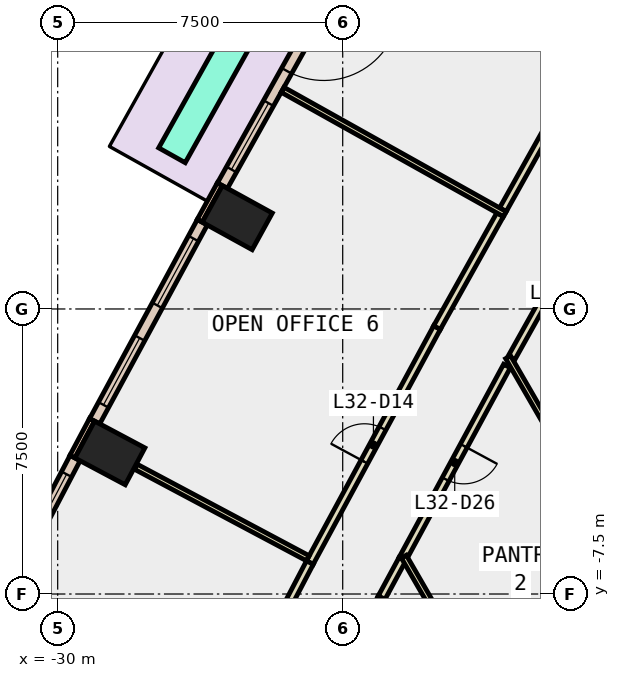
"""IFC4 building model, lengths in metres.
Left out: names, types, materials, properties, quantities, classifications, styles, units other than length and angle.
Written with IfcOpenShell. Run it as: python <this file> out.ifc"""

import sys

from ifc_helpers import new_model, si_unit, direction, frame, frame_2d, origin, origin_2d, place, context, subcontext, project, spatial, rectangle, extrude, element, fill, save


model = new_model("IFC4")
c1 = context("Model", 3, precision=1e-05, world=origin(), true_north=direction((0.0, 1.0)))
c2 = subcontext(c1, "Body", "Model", "MODEL_VIEW")
j1 = project(units=[si_unit("LENGTHUNIT", "METRE"), si_unit("PLANEANGLEUNIT", "RADIAN")], contexts=[c1])
p1 = place(None, origin())
s1 = spatial("IfcSite", under=j1, at=p1, CompositionType="ELEMENT")
p2 = place(p1, origin())
s2 = spatial("IfcBuilding", under=s1, at=p2, CompositionType="ELEMENT")
p3 = place(p2, frame((0.0, 0.0, 146.6)))
s3 = spatial("IfcBuildingStorey", under=s2, at=p3, CompositionType="ELEMENT", Elevation=146.6)
for number, where, z_axis, x_axis in (
    (1, (-25.275, 2.403, -0.4), (0.0, 0.0, 1.0), (0.482, 0.876, 0.0)),
    (2, (-28.626, -3.788, -0.4), (0.0, 0.0, 1.0), (0.47, 0.883, 0.0)),
):
    element("IfcColumn", number, at=place(p3, frame(where, z_axis=z_axis, x_axis=x_axis)), inside=s3, PredefinedType="COLUMN", context=c2, shape_type="SweptSolid", body=[
        extrude(rectangle(XDim=1.1, YDim=1.5, at=origin_2d()), origin(), (0.0, 0.0, 1.0), 4.2),
    ])
for number, where, z_axis, x_axis in (
    (3, (-25.733, 3.283, 0.0), (0.0, 0.0, 1.0), (-0.482, -0.876, 0.0)),
    (4, (-29.095, -2.915, 0.0), (0.0, 0.0, 1.0), (-0.47, -0.883, 0.0)),
):
    element("IfcWall", number, at=place(p3, frame(where, z_axis=z_axis, x_axis=x_axis)), inside=s3, PredefinedType="STANDARD", context=c2, shape_type="SweptSolid", body=[
        extrude(rectangle(XDim=1.1, YDim=0.15, at=frame_2d((0.55, 0.0))), origin(), (0.0, 0.0, 1.0), 3.8),
    ])
p4 = place(p3, frame((-22.761, 8.438, 0.0), z_axis=(0.0, 0.0, 1.0), x_axis=(-0.488009846284, -0.872838123555, 0.0)))
e5 = element("IfcWall", 5, at=p4, inside=s3, PredefinedType="STANDARD", context=c2, shape_type="SweptSolid", body=[
    extrude(rectangle(XDim=5.951, YDim=0.3, at=frame_2d((2.976, 0.0))), origin(), (0.0, 0.0, 1.0), 3.8),
])
p5 = place(p4, frame((0.488, 0.0, 0.0)))
e6 = element("IfcOpeningElement", 6, at=p5, cuts=e5, PredefinedType="OPENING", context=c2, shape_type="SweptSolid", body=[
    extrude(rectangle(XDim=2.0, YDim=2.4, at=frame_2d((1.0, 1.2))), frame((0.0, 0.16, 0.0), z_axis=(0.0, -1.0, 0.0), x_axis=(1.0, 0.0, 0.0)), (0.0, 0.0, 1.0), 0.32),
])
p6 = place(p4, frame((3.463, 0.0, 0.9)))
e7 = element("IfcOpeningElement", 7, at=p6, cuts=e5, PredefinedType="OPENING", context=c2, shape_type="SweptSolid", body=[
    extrude(rectangle(XDim=2.0, YDim=2.6, at=frame_2d((1.0, 1.3))), frame((0.0, 0.16, 0.0), z_axis=(0.0, -1.0, 0.0), x_axis=(1.0, 0.0, 0.0)), (0.0, 0.0, 1.0), 0.32),
])
p7 = place(p3, frame((-26.194, 2.282, 0.0), z_axis=(0.0, 0.0, 1.0), x_axis=(-0.475794135288, -0.87955667289, 0.0)))
e8 = element("IfcWall", 8, at=p7, inside=s3, PredefinedType="STANDARD", context=c2, shape_type="SweptSolid", body=[
    extrude(rectangle(XDim=5.952, YDim=0.3, at=frame_2d((2.976, 0.0))), origin(), (0.0, 0.0, 1.0), 3.8),
])
p8 = place(p7, frame((0.488, 0.0, 0.9)))
e9 = element("IfcOpeningElement", 9, at=p8, cuts=e8, PredefinedType="OPENING", context=c2, shape_type="SweptSolid", body=[
    extrude(rectangle(XDim=2.0, YDim=2.6, at=frame_2d((1.0, 1.3))), frame((0.0, 0.16, 0.0), z_axis=(0.0, -1.0, 0.0), x_axis=(1.0, 0.0, 0.0)), (0.0, 0.0, 1.0), 0.32),
])
p9 = place(p7, frame((3.464, 0.0, 0.9)))
e10 = element("IfcOpeningElement", 10, at=p9, cuts=e8, PredefinedType="OPENING", context=c2, shape_type="SweptSolid", body=[
    extrude(rectangle(XDim=2.0, YDim=2.6, at=frame_2d((1.0, 1.3))), frame((0.0, 0.16, 0.0), z_axis=(0.0, -1.0, 0.0), x_axis=(1.0, 0.0, 0.0)), (0.0, 0.0, 1.0), 0.32),
])
p10 = place(p3, frame((-29.542, -3.922, 0.0), z_axis=(0.0, 0.0, 1.0), x_axis=(-0.463809970306, -0.885934710599, 0.0)))
e11 = element("IfcWall", 11, at=p10, inside=s3, PredefinedType="STANDARD", context=c2, shape_type="SweptSolid", body=[
    extrude(rectangle(XDim=5.927, YDim=0.3, at=frame_2d((2.963, 0.0))), origin(), (0.0, 0.0, 1.0), 3.8),
])
p11 = place(p10, frame((0.482, 0.0, 0.9)))
e12 = element("IfcOpeningElement", 12, at=p11, cuts=e11, PredefinedType="OPENING", context=c2, shape_type="SweptSolid", body=[
    extrude(rectangle(XDim=2.0, YDim=2.6, at=frame_2d((1.0, 1.3))), frame((0.0, 0.16, 0.0), z_axis=(0.0, -1.0, 0.0), x_axis=(1.0, 0.0, 0.0)), (0.0, 0.0, 1.0), 0.32),
])
p12 = place(p10, frame((3.445, 0.0, 0.9)))
e13 = element("IfcOpeningElement", 13, at=p12, cuts=e11, PredefinedType="OPENING", context=c2, shape_type="SweptSolid", body=[
    extrude(rectangle(XDim=2.0, YDim=2.6, at=frame_2d((1.0, 1.3))), frame((0.0, 0.16, 0.0), z_axis=(0.0, -1.0, 0.0), x_axis=(1.0, 0.0, 0.0)), (0.0, 0.0, 1.0), 0.32),
])
p13 = place(p3, frame((-24.138, 9.151, 0.0), z_axis=(0.0, 0.0, 1.0), x_axis=(-0.487965376719, -0.87286298531, 0.0)))
e14 = element("IfcWall", 14, at=p13, inside=s3, PredefinedType="STANDARD", context=c2, shape_type="SweptSolid", body=[
    extrude(rectangle(XDim=5.851, YDim=0.8, at=frame_2d((2.925, 0.0))), origin(), (0.0, 0.0, 1.0), 0.8),
])
p14 = place(p3, frame((-14.955, 4.264, 0.0), z_axis=(0.0, 0.0, 1.0), x_axis=(-0.4879770011, -0.872856486713, 0.0)))
e15 = element("IfcWall", 15, at=p14, inside=s3, PredefinedType="PARTITIONING", context=c2, shape_type="SweptSolid", body=[
    extrude(rectangle(XDim=6.363, YDim=0.2, at=frame_2d((3.182, 0.0))), origin(), (0.0, 0.0, 1.0), 3.8),
])
p15 = place(p14, frame((2.681, 0.0, 0.0)))
e16 = element("IfcOpeningElement", 16, at=p15, cuts=e15, PredefinedType="OPENING", context=c2, shape_type="SweptSolid", body=[
    extrude(rectangle(XDim=1.0, YDim=2.1, at=frame_2d((0.5, 1.05))), frame((0.0, 0.11, 0.0), z_axis=(0.0, -1.0, 0.0), x_axis=(1.0, 0.0, 0.0)), (0.0, 0.0, 1.0), 0.22),
])
p16 = place(p3, frame((-18.178, -1.501, 0.0), z_axis=(0.0, 0.0, 1.0), x_axis=(-0.475923642768, -0.879486603795, 0.0)))
e17 = element("IfcWall", 17, at=p16, inside=s3, PredefinedType="PARTITIONING", context=c2, shape_type="SweptSolid", body=[
    extrude(rectangle(XDim=5.776, YDim=0.2, at=frame_2d((2.888, 0.0))), origin(), (0.0, 0.0, 1.0), 3.8),
])
p17 = place(p16, frame((2.388, 0.0, 0.0)))
e18 = element("IfcOpeningElement", 18, at=p17, cuts=e17, PredefinedType="OPENING", context=c2, shape_type="SweptSolid", body=[
    extrude(rectangle(XDim=1.0, YDim=2.1, at=frame_2d((0.5, 1.05))), frame((0.0, 0.11, 0.0), z_axis=(0.0, -1.0, 0.0), x_axis=(1.0, 0.0, 0.0)), (0.0, 0.0, 1.0), 0.22),
])
p18 = place(p3, frame((-21.475, -7.594, 0.0), z_axis=(0.0, 0.0, 1.0), x_axis=(-0.463809970306, -0.885934710599, 0.0)))
e19 = element("IfcWall", 19, at=p18, inside=s3, PredefinedType="PARTITIONING", context=c2, shape_type="SweptSolid", body=[
    extrude(rectangle(XDim=5.927, YDim=0.2, at=frame_2d((2.963, 0.0))), origin(), (0.0, 0.0, 1.0), 3.8),
])
p19 = place(p18, frame((2.464, 0.0, 0.0)))
e20 = element("IfcOpeningElement", 20, at=p19, cuts=e19, PredefinedType="OPENING", context=c2, shape_type="SweptSolid", body=[
    extrude(rectangle(XDim=1.0, YDim=2.1, at=frame_2d((0.5, 1.05))), frame((0.0, 0.11, 0.0), z_axis=(0.0, -1.0, 0.0), x_axis=(1.0, 0.0, 0.0)), (0.0, 0.0, 1.0), 0.22),
])
p20 = place(p3, frame((-20.927, -6.581, 0.0), z_axis=(0.0, 0.0, 1.0), x_axis=(-0.475893856394, -0.879502721682, 0.0)))
e21 = element("IfcWall", 21, at=p20, inside=s3, PredefinedType="PARTITIONING", context=c2, shape_type="SweptSolid", body=[
    extrude(rectangle(XDim=1.152, YDim=0.2, at=frame_2d((0.576, 0.0))), origin(), (0.0, 0.0, 1.0), 3.8),
])
p21 = place(p3, frame((-18.284, 2.612, 0.0), z_axis=(0.0, 0.0, 1.0), x_axis=(0.487871212611, 0.872915620152, 0.0)))
e22 = element("IfcWall", 22, at=p21, inside=s3, PredefinedType="PARTITIONING", context=c2, shape_type="SweptSolid", body=[
    extrude(rectangle(XDim=3.402, YDim=0.2, at=frame_2d((1.701, 0.0))), origin(), (0.0, 0.0, 1.0), 3.8),
])
p22 = place(p3, frame((-23.365, -6.673, 0.0), z_axis=(0.0, 0.0, 1.0), x_axis=(0.47597665142, 0.879457916732, 0.0)))
e23 = element("IfcWall", 23, at=p22, inside=s3, PredefinedType="PARTITIONING", context=c2, shape_type="SweptSolid", body=[
    extrude(rectangle(XDim=7.032, YDim=0.2, at=frame_2d((3.516, 0.0))), origin(), (0.0, 0.0, 1.0), 3.8),
])
p23 = place(p22, frame((3.016, 0.0, 0.0)))
e24 = element("IfcOpeningElement", 24, at=p23, cuts=e23, PredefinedType="OPENING", context=c2, shape_type="SweptSolid", body=[
    extrude(rectangle(XDim=1.0, YDim=2.1, at=frame_2d((0.5, 1.05))), frame((0.0, 0.11, 0.0), z_axis=(0.0, -1.0, 0.0), x_axis=(1.0, 0.0, 0.0)), (0.0, 0.0, 1.0), 0.22),
])
p24 = place(p3, frame((-20.018, -0.489, 0.0), z_axis=(0.0, 0.0, 1.0), x_axis=(0.48792588674, 0.872885060617, 0.0)))
e25 = element("IfcWall", 25, at=p24, inside=s3, PredefinedType="PARTITIONING", context=c2, shape_type="SweptSolid", body=[
    extrude(rectangle(XDim=3.403, YDim=0.2, at=frame_2d((1.701, 0.0))), origin(), (0.0, 0.0, 1.0), 3.8),
])
p25 = place(p3, frame((-26.21, -12.111, 0.0), z_axis=(0.0, 0.0, 1.0), x_axis=(0.46374980173, 0.885966207818, 0.0)))
e26 = element("IfcWall", 26, at=p25, inside=s3, PredefinedType="PARTITIONING", context=c2, shape_type="SweptSolid", body=[
    extrude(rectangle(XDim=6.137, YDim=0.2, at=frame_2d((3.068, 0.0))), origin(), (0.0, 0.0, 1.0), 3.8),
])
p26 = place(p25, frame((2.644, 0.0, 0.0)))
e27 = element("IfcOpeningElement", 27, at=p26, cuts=e26, PredefinedType="OPENING", context=c2, shape_type="SweptSolid", body=[
    extrude(rectangle(XDim=1.0, YDim=2.1, at=frame_2d((0.5, 1.05))), frame((0.0, 0.11, 0.0), z_axis=(0.0, -1.0, 0.0), x_axis=(1.0, 0.0, 0.0)), (0.0, 0.0, 1.0), 0.22),
])
p27 = place(p3, frame((-14.567, -7.469, 0.0), z_axis=(0.0, 0.0, 1.0), x_axis=(-0.500056007527, 0.865993065409, 0.0)))
e28 = element("IfcWall", 28, at=p27, inside=s3, PredefinedType="PARTITIONING", context=c2, shape_type="SweptSolid", body=[
    extrude(rectangle(XDim=7.159, YDim=0.15, at=frame_2d((3.58, 0.0))), origin(), (0.0, 0.0, 1.0), 3.8),
])
p28 = place(p3, frame((-18.518, -10.625, 0.0), z_axis=(0.0, 0.0, 1.0), x_axis=(-0.50001189137, 0.86601853819, 0.0)))
e29 = element("IfcWall", 29, at=p28, inside=s3, PredefinedType="PARTITIONING", context=c2, shape_type="SweptSolid", body=[
    extrude(rectangle(XDim=4.746, YDim=0.15, at=frame_2d((2.373, 0.0))), origin(), (0.0, 0.0, 1.0), 3.8),
])
p29 = place(p3, frame((-18.234, 2.497, 0.0), z_axis=(0.0, 0.0, 1.0), x_axis=(-0.872820235044, 0.4880418397, 0.0)))
e30 = element("IfcWall", 30, at=p29, inside=s3, PredefinedType="PARTITIONING", context=c2, shape_type="SweptSolid", body=[
    extrude(rectangle(XDim=6.7, YDim=0.15, at=frame_2d((3.35, 0.0))), origin(), (0.0, 0.0, 1.0), 3.8),
])
p30 = place(p3, frame((-23.417, -6.56, 0.0), z_axis=(0.0, 0.0, 1.0), x_axis=(-0.882784638588, 0.469777906967, 0.0)))
e31 = element("IfcWall", 31, at=p30, inside=s3, PredefinedType="PARTITIONING", context=c2, shape_type="SweptSolid", body=[
    extrude(rectangle(XDim=5.13, YDim=0.15, at=frame_2d((2.565, 0.0))), origin(), (0.0, 0.0, 1.0), 3.8),
])
p31 = place(p5, origin())
e32 = element("IfcDoor", 32, at=p31, inside=s3, OperationType="SLIDING_TO_LEFT", PredefinedType="DOOR", context=c2, shape_type="SweptSolid", body=[
    extrude(rectangle(XDim=2.0, YDim=2.4, at=frame_2d((1.0, 1.2))), frame((0.0, 0.025, 0.0), z_axis=(0.0, -1.0, 0.0), x_axis=(1.0, 0.0, 0.0)), (0.0, 0.0, 1.0), 0.05),
])
fill(e6, e32)
p32 = place(p6, origin())
e33 = element("IfcWindow", 33, at=p32, inside=s3, PartitioningType="SINGLE_PANEL", PredefinedType="WINDOW", context=c2, shape_type="SweptSolid", body=[
    extrude(rectangle(XDim=2.0, YDim=2.6, at=frame_2d((1.0, 1.3))), frame((0.0, 0.03, 0.0), z_axis=(0.0, -1.0, 0.0), x_axis=(1.0, 0.0, 0.0)), (0.0, 0.0, 1.0), 0.06),
])
fill(e7, e33)
p33 = place(p8, origin())
e34 = element("IfcWindow", 34, at=p33, inside=s3, PartitioningType="SINGLE_PANEL", PredefinedType="WINDOW", context=c2, shape_type="SweptSolid", body=[
    extrude(rectangle(XDim=2.0, YDim=2.6, at=frame_2d((1.0, 1.3))), frame((0.0, 0.03, 0.0), z_axis=(0.0, -1.0, 0.0), x_axis=(1.0, 0.0, 0.0)), (0.0, 0.0, 1.0), 0.06),
])
fill(e9, e34)
p34 = place(p9, origin())
e35 = element("IfcWindow", 35, at=p34, inside=s3, PartitioningType="SINGLE_PANEL", PredefinedType="WINDOW", context=c2, shape_type="SweptSolid", body=[
    extrude(rectangle(XDim=2.0, YDim=2.6, at=frame_2d((1.0, 1.3))), frame((0.0, 0.03, 0.0), z_axis=(0.0, -1.0, 0.0), x_axis=(1.0, 0.0, 0.0)), (0.0, 0.0, 1.0), 0.06),
])
fill(e10, e35)
p35 = place(p11, origin())
e36 = element("IfcWindow", 36, at=p35, inside=s3, PartitioningType="SINGLE_PANEL", PredefinedType="WINDOW", context=c2, shape_type="SweptSolid", body=[
    extrude(rectangle(XDim=2.0, YDim=2.6, at=frame_2d((1.0, 1.3))), frame((0.0, 0.03, 0.0), z_axis=(0.0, -1.0, 0.0), x_axis=(1.0, 0.0, 0.0)), (0.0, 0.0, 1.0), 0.06),
])
fill(e12, e36)
p36 = place(p23, origin())
e37 = element("IfcDoor", 37, at=p36, inside=s3, OperationType="SINGLE_SWING_LEFT", PredefinedType="DOOR", context=c2, shape_type="SweptSolid", body=[
    extrude(rectangle(XDim=1.0, YDim=2.1, at=frame_2d((0.5, 1.05))), frame((0.0, 0.025, 0.0), z_axis=(0.0, -1.0, 0.0), x_axis=(1.0, 0.0, 0.0)), (0.0, 0.0, 1.0), 0.05),
])
fill(e24, e37)
p37 = place(p17, origin())
e38 = element("IfcDoor", 38, at=p37, inside=s3, OperationType="SINGLE_SWING_LEFT", PredefinedType="DOOR", context=c2, shape_type="SweptSolid", body=[
    extrude(rectangle(XDim=1.0, YDim=2.1, at=frame_2d((0.5, 1.05))), frame((0.0, 0.025, 0.0), z_axis=(0.0, -1.0, 0.0), x_axis=(1.0, 0.0, 0.0)), (0.0, 0.0, 1.0), 0.05),
])
fill(e18, e38)
save(model, sys.argv[1])
